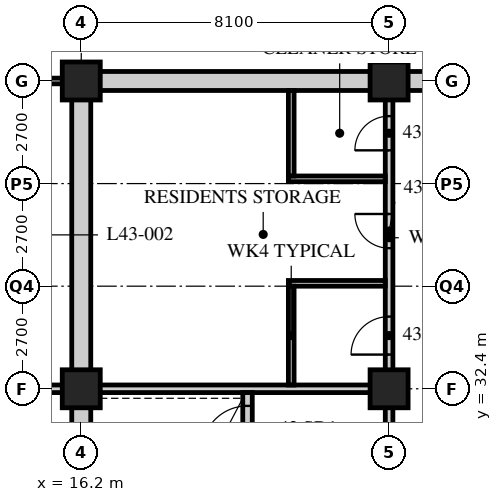
"""IFC4 building model, lengths in metres.
Left out: names, types, materials, properties, quantities, classifications, styles, units other than length and angle.
Written with IfcOpenShell. Run it as: python <this file> out.ifc"""

import sys

from ifc_helpers import new_model, si_unit, direction, frame, frame_2d, origin, origin_2d, place, context, subcontext, project, spatial, rectangle, hollow_rectangle, extrude, element, fill, save


model = new_model("IFC4")
c1 = context("Model", 3, precision=1e-05, world=origin(), true_north=direction((0.0, 1.0)))
c2 = subcontext(c1, "Body", "Model", "MODEL_VIEW")
j1 = project(units=[si_unit("LENGTHUNIT", "METRE"), si_unit("PLANEANGLEUNIT", "RADIAN")], contexts=[c1])
p1 = place(None, origin())
s1 = spatial("IfcSite", under=j1, at=p1, CompositionType="ELEMENT")
p2 = place(p1, origin())
s2 = spatial("IfcBuilding", under=s1, at=p2, CompositionType="ELEMENT")
p3 = place(p2, frame((0.0, 0.0, 170.4)))
s3 = spatial("IfcBuildingStorey", under=s2, at=p3, CompositionType="ELEMENT", Elevation=170.4)
for number, where, z_axis, x_axis in (
    (1, (16.2, 32.4, 0.0), (0.0, 0.0, 1.0), (1.0, 0.0, 0.0)),
    (2, (16.2, 40.5, 0.0), (0.0, 0.0, 1.0), (1.0, 0.0, 0.0)),
    (3, (24.3, 32.4, 0.0), (0.0, 0.0, 1.0), (1.0, 0.0, 0.0)),
    (4, (24.3, 40.5, 0.0), (0.0, 0.0, 1.0), (1.0, 0.0, 0.0)),
):
    element("IfcColumn", number, at=place(p3, frame(where, z_axis=z_axis, x_axis=x_axis)), inside=s3, PredefinedType="COLUMN", context=c2, shape_type="SweptSolid", body=[
        extrude(hollow_rectangle(XDim=1.0, YDim=1.0, WallThickness=0.1, at=origin_2d()), origin(), (0.0, 0.0, 1.0), 3.6),
    ])
p4 = place(p3, frame((16.0, 40.5, 0.0), z_axis=(0.0, 0.0, 1.0), x_axis=(-1.0, 0.0, 0.0)))
e5 = element("IfcWall", 5, at=p4, inside=s3, PredefinedType="PARTITIONING", context=c2, shape_type="SweptSolid", body=[
    extrude(rectangle(XDim=2.05, YDim=0.15, at=frame_2d((1.025, 0.0))), origin(), (0.0, 0.0, 1.0), 3.39),
])
p5 = place(p3, frame((13.95, 32.4, 0.0), z_axis=(0.0, 0.0, 1.0), x_axis=(1.0, 0.0, 0.0)))
e6 = element("IfcWall", 6, at=p5, inside=s3, PredefinedType="SOLIDWALL", context=c2, shape_type="SweptSolid", body=[
    extrude(rectangle(XDim=2.25, YDim=0.2, at=frame_2d((1.125, 0.0))), origin(), (0.0, 0.0, 1.0), 3.39),
])
p6 = place(p3, frame((15.95, 40.5, 0.0), z_axis=(0.0, 0.0, 1.0), x_axis=(1.0, 0.0, 0.0)))
e7 = element("IfcWall", 7, at=p6, inside=s3, PredefinedType="SOLIDWALL", context=c2, shape_type="SweptSolid", body=[
    extrude(rectangle(XDim=24.8, YDim=0.5, at=frame_2d((12.4, 0.0))), origin(), (0.0, 0.0, 1.0), 2.74),
])
p7 = place(p6, frame((11.5, 0.0, 0.0)))
e8 = element("IfcOpeningElement", 8, at=p7, cuts=e7, PredefinedType="OPENING", context=c2, shape_type="SweptSolid", body=[
    extrude(rectangle(XDim=1.8, YDim=2.4, at=frame_2d((0.9, 1.2))), frame((0.0, 0.26, 0.0), z_axis=(0.0, -1.0, 0.0), x_axis=(1.0, 0.0, 0.0)), (0.0, 0.0, 1.0), 0.52),
])
p8 = place(p3, frame((16.2, 24.55, 0.0), z_axis=(0.0, 0.0, 1.0), x_axis=(0.0, 1.0, 0.0)))
e9 = element("IfcWall", 9, at=p8, inside=s3, PredefinedType="SOLIDWALL", context=c2, shape_type="SweptSolid", body=[
    extrude(rectangle(XDim=15.7, YDim=0.5, at=frame_2d((7.85, 0.0))), origin(), (0.0, 0.0, 1.0), 2.778),
])
p9 = place(p3, frame((16.45, 32.4, 0.0), z_axis=(0.0, 0.0, 1.0), x_axis=(1.0, 0.0, 0.0)))
e10 = element("IfcWall", 10, at=p9, inside=s3, PredefinedType="SOLIDWALL", context=c2, shape_type="SweptSolid", body=[
    extrude(rectangle(XDim=7.95, YDim=0.2, at=frame_2d((3.975, 0.0))), origin(), (0.0, 0.0, 1.0), 2.778),
])
p10 = place(p3, frame((24.3, 24.55, 0.0), z_axis=(0.0, 0.0, 1.0), x_axis=(0.0, 1.0, 0.0)))
e11 = element("IfcWall", 11, at=p10, inside=s3, PredefinedType="SOLIDWALL", context=c2, shape_type="SweptSolid", body=[
    extrude(rectangle(XDim=7.75, YDim=0.2, at=frame_2d((3.875, 0.0))), origin(), (0.0, 0.0, 1.0), 2.778),
])
p11 = place(p10, frame((4.6, 0.0, 0.0)))
e12 = element("IfcOpeningElement", 12, at=p11, cuts=e11, PredefinedType="OPENING", context=c2, shape_type="SweptSolid", body=[
    extrude(rectangle(XDim=1.2, YDim=2.1, at=frame_2d((0.6, 1.05))), frame((0.0, 0.11, 0.0), z_axis=(0.0, -1.0, 0.0), x_axis=(1.0, 0.0, 0.0)), (0.0, 0.0, 1.0), 0.22),
])
p12 = place(p3, frame((20.575, 24.55, 0.0), z_axis=(0.0, 0.0, 1.0), x_axis=(0.0, 1.0, 0.0)))
e13 = element("IfcWall", 13, at=p12, inside=s3, PredefinedType="SOLIDWALL", context=c2, shape_type="SweptSolid", body=[
    extrude(rectangle(XDim=7.75, YDim=0.25, at=frame_2d((3.875, 0.0))), origin(), (0.0, 0.0, 1.0), 3.39),
])
p13 = place(p12, frame((6.2, 0.0, 0.0)))
e14 = element("IfcOpeningElement", 14, at=p13, cuts=e13, PredefinedType="OPENING", context=c2, shape_type="SweptSolid", body=[
    extrude(rectangle(XDim=1.2, YDim=2.1, at=frame_2d((0.6, 1.05))), frame((0.0, 0.135, 0.0), z_axis=(0.0, -1.0, 0.0), x_axis=(1.0, 0.0, 0.0)), (0.0, 0.0, 1.0), 0.27),
])
p14 = place(p3, frame((24.3, 32.5, 0.0), z_axis=(0.0, 0.0, 1.0), x_axis=(0.0, 1.0, 0.0)))
e15 = element("IfcWall", 15, at=p14, inside=s3, PredefinedType="PARTITIONING", context=c2, shape_type="SweptSolid", body=[
    extrude(rectangle(XDim=7.75, YDim=0.2, at=frame_2d((3.875, 0.0))), origin(), (0.0, 0.0, 1.0), 2.778),
])
p15 = place(p14, frame((0.8, 0.0, 0.0)))
e16 = element("IfcOpeningElement", 16, at=p15, cuts=e15, PredefinedType="OPENING", context=c2, shape_type="SweptSolid", body=[
    extrude(rectangle(XDim=1.0, YDim=2.1, at=frame_2d((0.5, 1.05))), frame((0.0, 0.11, 0.0), z_axis=(0.0, -1.0, 0.0), x_axis=(1.0, 0.0, 0.0)), (0.0, 0.0, 1.0), 0.22),
])
p16 = place(p14, frame((3.6, 0.0, 0.0)))
e17 = element("IfcOpeningElement", 17, at=p16, cuts=e15, PredefinedType="OPENING", context=c2, shape_type="SweptSolid", body=[
    extrude(rectangle(XDim=0.9, YDim=2.1, at=frame_2d((0.45, 1.05))), frame((0.0, 0.11, 0.0), z_axis=(0.0, -1.0, 0.0), x_axis=(1.0, 0.0, 0.0)), (0.0, 0.0, 1.0), 0.22),
])
p17 = place(p14, frame((6.175, 0.0, 0.0)))
e18 = element("IfcOpeningElement", 18, at=p17, cuts=e15, PredefinedType="OPENING", context=c2, shape_type="SweptSolid", body=[
    extrude(rectangle(XDim=0.9, YDim=2.1, at=frame_2d((0.45, 1.05))), frame((0.0, 0.11, 0.0), z_axis=(0.0, -1.0, 0.0), x_axis=(1.0, 0.0, 0.0)), (0.0, 0.0, 1.0), 0.22),
])
for number, where, z_axis, x_axis in (
    (19, (21.65, 35.175, 0.0), (0.0, 0.0, 1.0), (1.0, 0.0, 0.0)),
    (20, (21.65, 37.925, 0.0), (0.0, 0.0, 1.0), (1.0, 0.0, 0.0)),
):
    element("IfcWall", number, at=place(p3, frame(where, z_axis=z_axis, x_axis=x_axis)), inside=s3, PredefinedType="PARTITIONING", context=c2, shape_type="SweptSolid", body=[
        extrude(rectangle(XDim=2.55, YDim=0.15, at=frame_2d((1.275, 0.0))), origin(), (0.0, 0.0, 1.0), 3.39),
    ])
p18 = place(p3, frame((21.725, 32.5, 0.0), z_axis=(0.0, 0.0, 1.0), x_axis=(0.0, 1.0, 0.0)))
e21 = element("IfcWall", 21, at=p18, inside=s3, PredefinedType="PARTITIONING", context=c2, shape_type="SweptSolid", body=[
    extrude(rectangle(XDim=2.6, YDim=0.15, at=frame_2d((1.3, 0.0))), origin(), (0.0, 0.0, 1.0), 3.39),
])
p19 = place(p3, frame((21.725, 38.0, 0.0), z_axis=(0.0, 0.0, 1.0), x_axis=(0.0, 1.0, 0.0)))
e22 = element("IfcWall", 22, at=p19, inside=s3, PredefinedType="PARTITIONING", context=c2, shape_type="SweptSolid", body=[
    extrude(rectangle(XDim=2.25, YDim=0.15, at=frame_2d((1.125, 0.0))), origin(), (0.0, 0.0, 1.0), 3.39),
])
p20 = place(p15, origin())
e23 = element("IfcDoor", 23, at=p20, inside=s3, OperationType="SINGLE_SWING_LEFT", PredefinedType="DOOR", context=c2, shape_type="SweptSolid", body=[
    extrude(rectangle(XDim=1.0, YDim=2.1, at=frame_2d((0.5, 1.05))), frame((0.0, 0.025, 0.0), z_axis=(0.0, -1.0, 0.0), x_axis=(1.0, 0.0, 0.0)), (0.0, 0.0, 1.0), 0.05),
])
fill(e16, e23)
p21 = place(p16, origin())
e24 = element("IfcDoor", 24, at=p21, inside=s3, OperationType="SINGLE_SWING_RIGHT", PredefinedType="DOOR", context=c2, shape_type="SweptSolid", body=[
    extrude(rectangle(XDim=0.9, YDim=2.1, at=frame_2d((0.45, 1.05))), frame((0.0, 0.025, 0.0), z_axis=(0.0, -1.0, 0.0), x_axis=(1.0, 0.0, 0.0)), (0.0, 0.0, 1.0), 0.05),
])
fill(e17, e24)
p22 = place(p17, origin())
e25 = element("IfcDoor", 25, at=p22, inside=s3, OperationType="SINGLE_SWING_LEFT", PredefinedType="DOOR", context=c2, shape_type="SweptSolid", body=[
    extrude(rectangle(XDim=0.9, YDim=2.1, at=frame_2d((0.45, 1.05))), frame((0.0, 0.025, 0.0), z_axis=(0.0, -1.0, 0.0), x_axis=(1.0, 0.0, 0.0)), (0.0, 0.0, 1.0), 0.05),
])
fill(e18, e25)
p23 = place(p13, origin())
e26 = element("IfcDoor", 26, at=p23, inside=s3, OperationType="SINGLE_SWING_LEFT", PredefinedType="DOOR", context=c2, shape_type="SweptSolid", body=[
    extrude(rectangle(XDim=1.2, YDim=2.1, at=frame_2d((0.6, 1.05))), frame((0.0, 0.025, 0.0), z_axis=(0.0, -1.0, 0.0), x_axis=(1.0, 0.0, 0.0)), (0.0, 0.0, 1.0), 0.05),
])
fill(e14, e26)
save(model, sys.argv[1])
